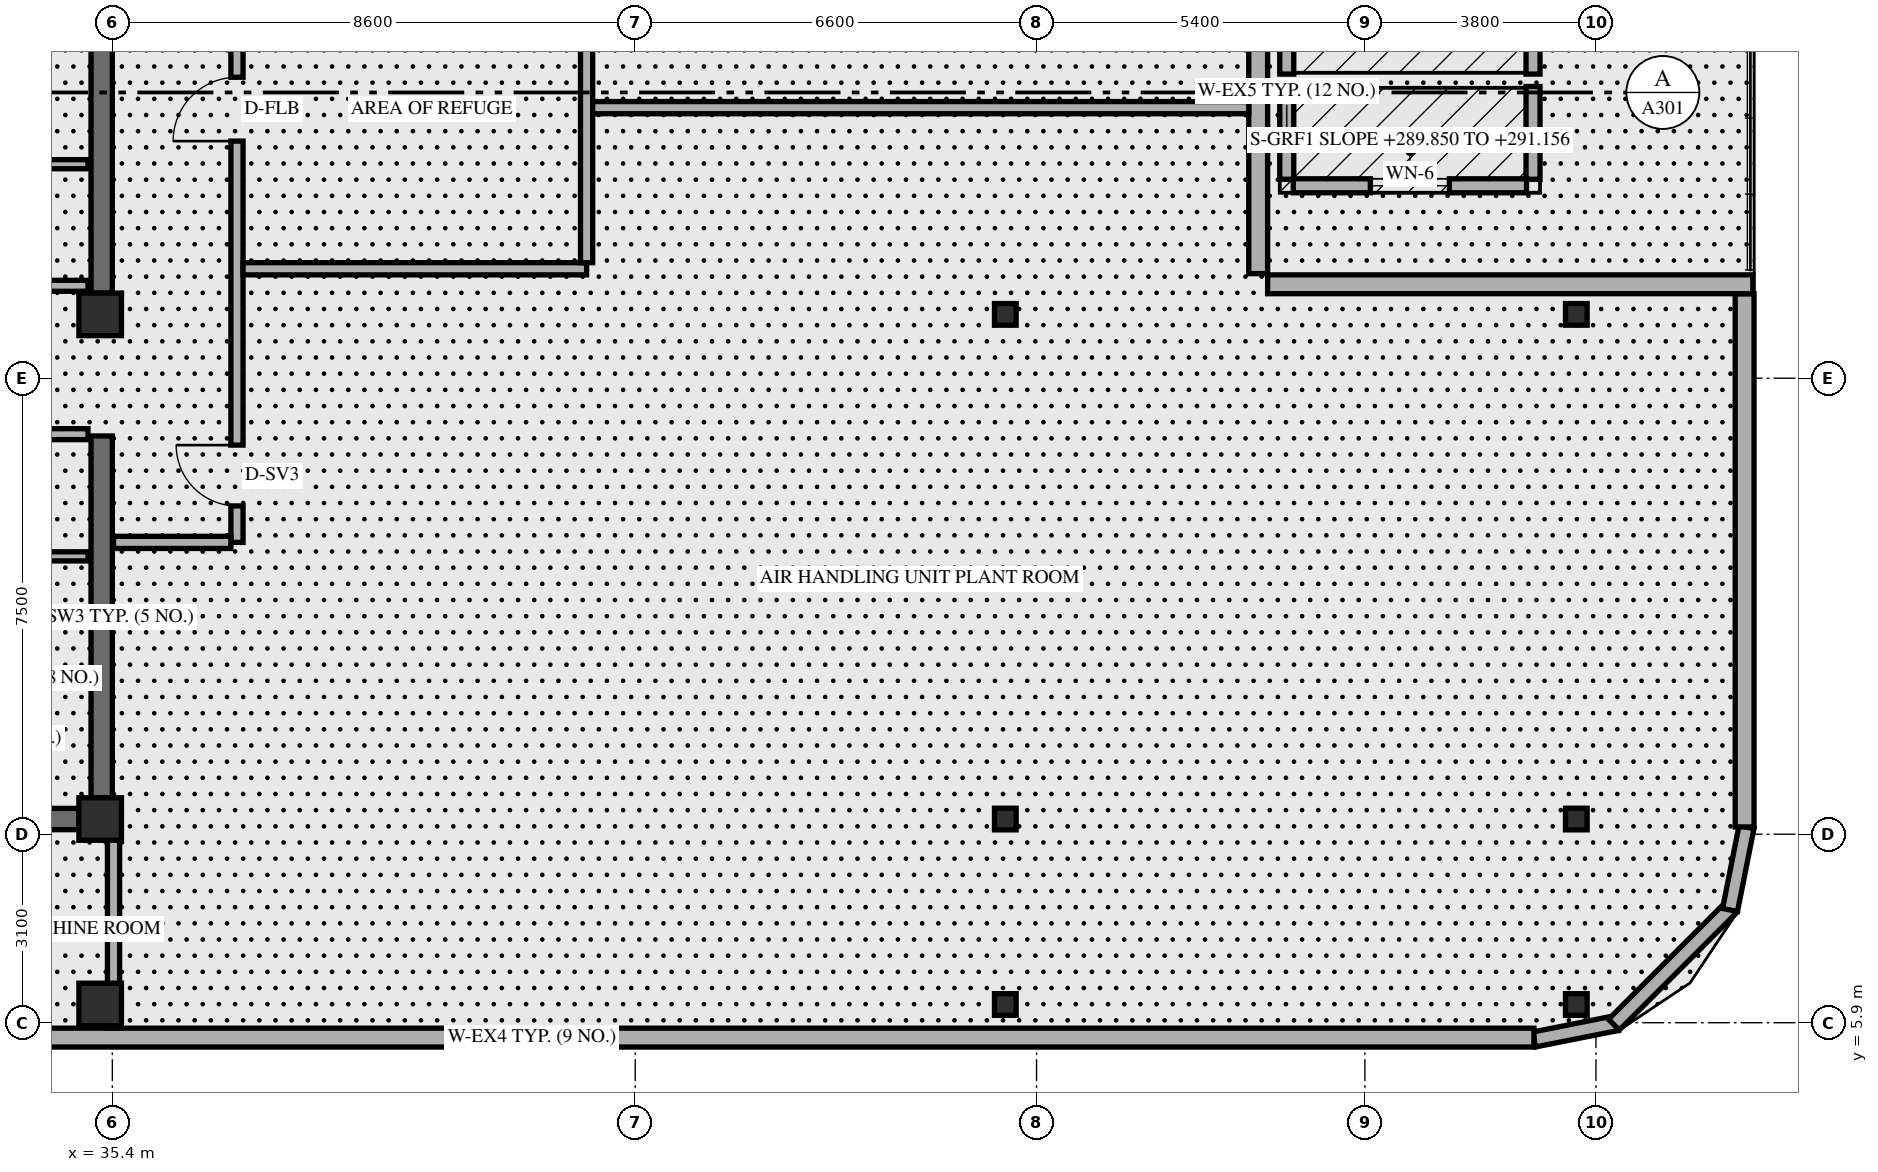
"""IFC4 building model, lengths in metres.
Left out: names, types, materials, properties, quantities, classifications, styles, units other than length and angle.
Written with IfcOpenShell. Run it as: python <this file> out.ifc"""

import sys

from ifc_helpers import new_model, si_unit, direction, frame, frame_2d, origin, origin_2d, place, context, subcontext, project, spatial, rectangle, hollow_rectangle, extrude, element, fill, save


model = new_model("IFC4")
c1 = context("Model", 3, precision=1e-05, world=origin(), true_north=direction((0.0, 1.0)))
c2 = subcontext(c1, "Body", "Model", "MODEL_VIEW")
j1 = project(units=[si_unit("LENGTHUNIT", "METRE"), si_unit("PLANEANGLEUNIT", "RADIAN")], contexts=[c1])
p1 = place(None, origin())
s1 = spatial("IfcSite", under=j1, at=p1, CompositionType="ELEMENT")
p2 = place(p1, origin())
s2 = spatial("IfcBuilding", under=s1, at=p2, CompositionType="ELEMENT")
p3 = place(p2, frame((0.0, 0.0, 287.0)))
s3 = spatial("IfcBuildingStorey", under=s2, at=p3, CompositionType="ELEMENT", Elevation=287.0)
p4 = place(p3, frame((35.225, 9.6, 0.0), z_axis=(0.0, 0.0, 1.0), x_axis=(0.0, 1.0, 0.0)))
e1 = element("IfcWall", 1, at=p4, inside=s3, PredefinedType="SHEAR", context=c2, shape_type="SweptSolid", body=[
    extrude(rectangle(XDim=5.95, YDim=0.35, at=frame_2d((2.975, 0.0))), origin(), (0.0, 0.0, 1.0), 5.161),
])
p5 = place(p3, frame((35.225, 17.9, 0.0), z_axis=(0.0, 0.0, 1.0), x_axis=(0.0, 1.0, 0.0)))
e2 = element("IfcWall", 2, at=p5, inside=s3, PredefinedType="SHEAR", context=c2, shape_type="SweptSolid", body=[
    extrude(rectangle(XDim=10.2, YDim=0.35, at=frame_2d((5.1, 0.0))), origin(), (0.0, 0.0, 1.0), 5.161),
])
p6 = place(p3, frame((24.55, 9.25, 0.0), z_axis=(0.0, 0.0, 1.0), x_axis=(1.0, 0.0, 0.0)))
e3 = element("IfcWall", 3, at=p6, inside=s3, PredefinedType="SHEAR", context=c2, shape_type="SweptSolid", body=[
    extrude(rectangle(XDim=10.3, YDim=0.35, at=frame_2d((5.15, 0.0))), origin(), (0.0, 0.0, 1.0), 5.7),
])
p7 = place(p6, frame((4.5, 0.0, 0.0)))
e4 = element("IfcOpeningElement", 4, at=p7, cuts=e3, PredefinedType="OPENING", context=c2, shape_type="SweptSolid", body=[
    extrude(rectangle(XDim=1.0, YDim=2.15, at=frame_2d((0.5, 1.075))), frame((0.0, 0.185, 0.0), z_axis=(0.0, -1.0, 0.0), x_axis=(1.0, 0.0, 0.0)), (0.0, 0.0, 1.0), 0.37),
])
for number, where, z_axis, x_axis in (
    (5, (35.2, 6.2, 0.0), (0.0, 0.0, 1.0), (1.0, 0.0, 0.0)),
    (6, (35.2, 9.25, 0.0), (0.0, 0.0, 1.0), (1.0, 0.0, 0.0)),
    (7, (35.2, 17.55, 0.0), (0.0, 0.0, 1.0), (1.0, 0.0, 0.0)),
):
    element("IfcColumn", number, at=place(p3, frame(where, z_axis=z_axis, x_axis=x_axis)), inside=s3, PredefinedType="COLUMN", context=c2, shape_type="SweptSolid", body=[
        extrude(rectangle(XDim=0.7, YDim=0.7, at=origin_2d()), origin(), (0.0, 0.0, 1.0), 5.996),
    ])
for number, where, z_axis, x_axis in (
    (8, (49.981, 6.2, 0.0), (0.035, 0.0, 0.999), (0.0, 1.0, 0.0)),
    (9, (49.981, 9.25, 0.0), (0.035, 0.0, 0.999), (0.0, 1.0, 0.0)),
    (10, (49.981, 17.55, 0.0), (0.035, 0.0, 0.999), (0.0, 1.0, 0.0)),
):
    element("IfcColumn", number, at=place(p3, frame(where, z_axis=z_axis, x_axis=x_axis)), inside=s3, PredefinedType="COLUMN", context=c2, shape_type="SweptSolid", body=[
        extrude(hollow_rectangle(XDim=0.356, YDim=0.356, WallThickness=0.016, at=origin_2d()), origin(), (0.0, 0.0, 1.0), 6.0),
    ])
for number, where, z_axis, x_axis in (
    (11, (59.303, 6.2, 0.0), (0.058, 0.0, 0.998), (0.0, 1.0, 0.0)),
    (12, (59.303, 9.25, 0.0), (0.058, 0.0, 0.998), (0.0, 1.0, 0.0)),
    (13, (59.303, 17.55, 0.0), (0.058, 0.0, 0.998), (0.0, 1.0, 0.0)),
):
    element("IfcColumn", number, at=place(p3, frame(where, z_axis=z_axis, x_axis=x_axis)), inside=s3, PredefinedType="COLUMN", context=c2, shape_type="SweptSolid", body=[
        extrude(hollow_rectangle(XDim=0.356, YDim=0.356, WallThickness=0.016, at=origin_2d()), origin(), (0.0, 0.0, 1.0), 6.006),
    ])
p8 = place(p3, frame((58.783, 5.624, 0.0), z_axis=(0.0, 0.0, 1.0), x_axis=(0.980809899341, 0.19496651342, 0.0)))
e14 = element("IfcWall", 14, at=p8, inside=s3, PredefinedType="SOLIDWALL", context=c2, shape_type="SweptSolid", body=[
    extrude(rectangle(XDim=1.389, YDim=0.25, at=frame_2d((0.694, 0.0))), origin(), (0.0, 0.0, 1.0), 5.7),
])
p9 = place(p3, frame((60.095, 5.868, 0.0), z_axis=(0.0, 0.0, 1.0), x_axis=(0.707106781187, 0.707106781187, 0.0)))
e15 = element("IfcWall", 15, at=p9, inside=s3, PredefinedType="SOLIDWALL", context=c2, shape_type="SweptSolid", body=[
    extrude(rectangle(XDim=2.739, YDim=0.25, at=frame_2d((1.37, 0.0))), origin(), (0.0, 0.0, 1.0), 5.7),
])
p10 = place(p3, frame((62.005, 7.754, 0.0), z_axis=(0.0, 0.0, 1.0), x_axis=(0.195135625965, 0.9807762678, 0.0)))
e16 = element("IfcWall", 16, at=p10, inside=s3, PredefinedType="SOLIDWALL", context=c2, shape_type="SweptSolid", body=[
    extrude(rectangle(XDim=1.389, YDim=0.25, at=frame_2d((0.694, 0.0))), origin(), (0.0, 0.0, 1.0), 5.7),
])
p11 = place(p3, frame((25.82, 5.655, 0.0), z_axis=(0.0, 0.0, 1.0), x_axis=(1.0, 0.0, 0.0)))
e17 = element("IfcWall", 17, at=p11, inside=s3, PredefinedType="SOLIDWALL", context=c2, shape_type="SweptSolid", body=[
    extrude(rectangle(XDim=32.96, YDim=0.31, at=frame_2d((16.48, 0.0))), origin(), (0.0, 0.0, 1.0), 5.7),
])
p12 = place(p3, frame((62.245, 9.12, 0.0), z_axis=(0.0, 0.0, 1.0), x_axis=(0.0, 1.0, 0.0)))
e18 = element("IfcWall", 18, at=p12, inside=s3, PredefinedType="SOLIDWALL", context=c2, shape_type="SweptSolid", body=[
    extrude(rectangle(XDim=8.77, YDim=0.31, at=frame_2d((4.385, 0.0))), origin(), (0.0, 0.0, 1.0), 5.7),
])
p13 = place(p3, frame((54.4, 18.045, 0.0), z_axis=(0.0, 0.0, 1.0), x_axis=(1.0, 0.0, 0.0)))
e19 = element("IfcWall", 19, at=p13, inside=s3, PredefinedType="SOLIDWALL", context=c2, shape_type="SweptSolid", body=[
    extrude(rectangle(XDim=7.98, YDim=0.31, at=frame_2d((3.99, 0.0))), origin(), (0.0, 0.0, 1.0), 5.219),
])
p14 = place(p3, frame((54.245, 18.22, 0.0), z_axis=(0.0, 0.0, 1.0), x_axis=(0.0, 1.0, 0.0)))
e20 = element("IfcWall", 20, at=p14, inside=s3, PredefinedType="SOLIDWALL", context=c2, shape_type="SweptSolid", body=[
    extrude(rectangle(XDim=11.36, YDim=0.31, at=frame_2d((5.68, 0.0))), origin(), (0.0, 0.0, 1.0), 5.7),
])
p15 = place(p14, frame((5.16, 0.0, 0.0)))
e21 = element("IfcOpeningElement", 21, at=p15, cuts=e20, PredefinedType="OPENING", context=c2, shape_type="SweptSolid", body=[
    extrude(rectangle(XDim=1.05, YDim=2.15, at=frame_2d((0.525, 1.075))), frame((0.0, 0.165, 0.0), z_axis=(0.0, -1.0, 0.0), x_axis=(1.0, 0.0, 0.0)), (0.0, 0.0, 1.0), 0.33),
])
for number, where, z_axis, x_axis in (
    (22, (54.715, 19.772, 0.0), (0.0, 0.0, 1.0), (0.0, 1.0, 0.0)),
    (23, (54.715, 21.502, 0.0), (0.0, 0.0, 1.0), (0.0, 1.0, 0.0)),
    (24, (58.765, 19.772, 0.0), (0.0, 0.0, 1.0), (0.0, 1.0, 0.0)),
    (25, (58.765, 21.502, 0.0), (0.0, 0.0, 1.0), (0.0, 1.0, 0.0)),
):
    element("IfcWall", number, at=place(p3, frame(where, z_axis=z_axis, x_axis=x_axis)), inside=s3, PredefinedType="SOLIDWALL", context=c2, shape_type="SweptSolid", body=[
        extrude(rectangle(XDim=1.526, YDim=0.23, at=frame_2d((0.763, 0.0))), origin(), (0.0, 0.0, 1.0), 2.264),
    ])
p16 = place(p3, frame((54.822, 19.665, 0.0), z_axis=(0.0, 0.0, 1.0), x_axis=(1.0, 0.0, 0.0)))
e26 = element("IfcWall", 26, at=p16, inside=s3, PredefinedType="SOLIDWALL", context=c2, shape_type="SweptSolid", body=[
    extrude(rectangle(XDim=3.836, YDim=0.23, at=frame_2d((1.918, 0.0))), origin(), (0.0, 0.0, 1.0), 2.264),
])
p17 = place(p16, frame((1.268, 0.0, 0.78)))
e27 = element("IfcOpeningElement", 27, at=p17, cuts=e26, PredefinedType="OPENING", context=c2, shape_type="SweptSolid", body=[
    extrude(rectangle(XDim=1.3, YDim=1.25, at=frame_2d((0.65, 0.625))), frame((0.0, 0.125, 0.0), z_axis=(0.0, -1.0, 0.0), x_axis=(1.0, 0.0, 0.0)), (0.0, 0.0, 1.0), 0.25),
])
p18 = place(p3, frame((32.74, 15.58, 0.0), z_axis=(0.0, 0.0, 1.0), x_axis=(1.0, 0.0, 0.0)))
e28 = element("IfcWall", 28, at=p18, inside=s3, PredefinedType="STANDARD", context=c2, shape_type="SweptSolid", body=[
    extrude(rectangle(XDim=2.26, YDim=0.18, at=frame_2d((1.13, 0.0))), origin(), (0.0, 0.0, 1.0), 5.7),
])
for number, where, z_axis, x_axis in (
    (29, (32.74, 11.57, 0.0), (0.0, 0.0, 1.0), (1.0, 0.0, 0.0)),
    (30, (32.74, 13.57, 0.0), (0.0, 0.0, 1.0), (1.0, 0.0, 0.0)),
):
    element("IfcWall", number, at=place(p3, frame(where, z_axis=z_axis, x_axis=x_axis)), inside=s3, PredefinedType="STANDARD", context=c2, shape_type="SweptSolid", body=[
        extrude(rectangle(XDim=2.26, YDim=0.15, at=frame_2d((1.13, 0.0))), origin(), (0.0, 0.0, 1.0), 5.7),
    ])
p19 = place(p3, frame((32.74, 18.02, 0.0), z_axis=(0.0, 0.0, 1.0), x_axis=(1.0, 0.0, 0.0)))
e31 = element("IfcWall", 31, at=p19, inside=s3, PredefinedType="STANDARD", context=c2, shape_type="SweptSolid", body=[
    extrude(rectangle(XDim=2.26, YDim=0.18, at=frame_2d((1.13, 0.0))), origin(), (0.0, 0.0, 1.0), 5.7),
])
p20 = place(p3, frame((32.74, 20.02, 0.0), z_axis=(0.0, 0.0, 1.0), x_axis=(1.0, 0.0, 0.0)))
e32 = element("IfcWall", 32, at=p20, inside=s3, PredefinedType="STANDARD", context=c2, shape_type="SweptSolid", body=[
    extrude(rectangle(XDim=2.26, YDim=0.15, at=frame_2d((1.13, 0.0))), origin(), (0.0, 0.0, 1.0), 5.7),
])
p21 = place(p3, frame((37.45, 13.8, 0.0), z_axis=(0.0, 0.0, 1.0), x_axis=(0.0, 1.0, 0.0)))
e33 = element("IfcWall", 33, at=p21, inside=s3, PredefinedType="STANDARD", context=c2, shape_type="SweptSolid", body=[
    extrude(rectangle(XDim=25.0, YDim=0.2, at=frame_2d((12.5, 0.0))), origin(), (0.0, 0.0, 1.0), 5.143),
])
p22 = place(p21, frame((6.6, 0.0, 0.0)))
e34 = element("IfcOpeningElement", 34, at=p22, cuts=e33, PredefinedType="OPENING", context=c2, shape_type="SweptSolid", body=[
    extrude(rectangle(XDim=1.05, YDim=2.15, at=frame_2d((0.525, 1.075))), frame((0.0, 0.11, 0.0), z_axis=(0.0, -1.0, 0.0), x_axis=(1.0, 0.0, 0.0)), (0.0, 0.0, 1.0), 0.22),
])
p23 = place(p21, frame((0.6, 0.0, 0.0)))
e35 = element("IfcOpeningElement", 35, at=p23, cuts=e33, PredefinedType="OPENING", context=c2, shape_type="SweptSolid", body=[
    extrude(rectangle(XDim=1.0, YDim=2.15, at=frame_2d((0.5, 1.075))), frame((0.0, 0.11, 0.0), z_axis=(0.0, -1.0, 0.0), x_axis=(1.0, 0.0, 0.0)), (0.0, 0.0, 1.0), 0.22),
])
p24 = place(p21, frame((11.6, 0.0, 0.0)))
e36 = element("IfcOpeningElement", 36, at=p24, cuts=e33, PredefinedType="OPENING", context=c2, shape_type="SweptSolid", body=[
    extrude(rectangle(XDim=1.05, YDim=2.15, at=frame_2d((0.525, 1.075))), frame((0.0, 0.11, 0.0), z_axis=(0.0, -1.0, 0.0), x_axis=(1.0, 0.0, 0.0)), (0.0, 0.0, 1.0), 0.22),
])
p25 = place(p21, frame((18.1, 0.0, 0.0)))
e37 = element("IfcOpeningElement", 37, at=p25, cuts=e33, PredefinedType="OPENING", context=c2, shape_type="SweptSolid", body=[
    extrude(rectangle(XDim=1.05, YDim=2.15, at=frame_2d((0.525, 1.075))), frame((0.0, 0.11, 0.0), z_axis=(0.0, -1.0, 0.0), x_axis=(1.0, 0.0, 0.0)), (0.0, 0.0, 1.0), 0.22),
])
p26 = place(p21, frame((22.0, 0.0, 0.0)))
e38 = element("IfcOpeningElement", 38, at=p26, cuts=e33, PredefinedType="OPENING", context=c2, shape_type="SweptSolid", body=[
    extrude(rectangle(XDim=1.05, YDim=2.15, at=frame_2d((0.525, 1.075))), frame((0.0, 0.11, 0.0), z_axis=(0.0, -1.0, 0.0), x_axis=(1.0, 0.0, 0.0)), (0.0, 0.0, 1.0), 0.22),
])
p27 = place(p3, frame((35.42, 13.8, 0.0), z_axis=(0.0, 0.0, 1.0), x_axis=(1.0, 0.0, 0.0)))
e39 = element("IfcWall", 39, at=p27, inside=s3, PredefinedType="STANDARD", context=c2, shape_type="SweptSolid", body=[
    extrude(rectangle(XDim=1.93, YDim=0.2, at=frame_2d((0.965, 0.0))), origin(), (0.0, 0.0, 1.0), 5.379),
])
p28 = place(p3, frame((37.55, 18.3, 0.0), z_axis=(0.0, 0.0, 1.0), x_axis=(1.0, 0.0, 0.0)))
e40 = element("IfcWall", 40, at=p28, inside=s3, PredefinedType="STANDARD", context=c2, shape_type="SweptSolid", body=[
    extrude(rectangle(XDim=5.65, YDim=0.2, at=frame_2d((2.825, 0.0))), origin(), (0.0, 0.0, 1.0), 5.7),
])
p29 = place(p3, frame((43.2, 18.4, 0.0), z_axis=(0.0, 0.0, 1.0), x_axis=(0.0, 1.0, 0.0)))
e41 = element("IfcWall", 41, at=p29, inside=s3, PredefinedType="STANDARD", context=c2, shape_type="SweptSolid", body=[
    extrude(rectangle(XDim=5.1, YDim=0.2, at=frame_2d((2.55, 0.0))), origin(), (0.0, 0.0, 1.0), 5.7),
])
p30 = place(p3, frame((43.3, 20.95, 0.0), z_axis=(0.0, 0.0, 1.0), x_axis=(1.0, 0.0, 0.0)))
e42 = element("IfcWall", 42, at=p30, inside=s3, PredefinedType="STANDARD", context=c2, shape_type="SweptSolid", body=[
    extrude(rectangle(XDim=10.79, YDim=0.2, at=frame_2d((5.395, 0.0))), origin(), (0.0, 0.0, 1.0), 5.143),
])
p31 = place(p3, frame((35.42, 5.81, 0.0), z_axis=(0.0, 0.0, 1.0), x_axis=(0.0, 1.0, 0.0)))
e43 = element("IfcWall", 43, at=p31, inside=s3, PredefinedType="STANDARD", context=c2, shape_type="SweptSolid", body=[
    extrude(rectangle(XDim=3.44, YDim=0.2, at=frame_2d((1.72, 0.0))), origin(), (0.0, 0.0, 1.0), 5.143),
])
p32 = place(p17, origin())
e44 = element("IfcWindow", 44, at=p32, inside=s3, PartitioningType="SINGLE_PANEL", PredefinedType="WINDOW", context=c2, shape_type="SweptSolid", body=[
    extrude(rectangle(XDim=1.3, YDim=1.25, at=frame_2d((0.65, 0.625))), frame((0.0, 0.03, 0.0), z_axis=(0.0, -1.0, 0.0), x_axis=(1.0, 0.0, 0.0)), (0.0, 0.0, 1.0), 0.06),
])
fill(e27, e44)
p33 = place(p22, origin())
e45 = element("IfcDoor", 45, at=p33, inside=s3, OperationType="SINGLE_SWING_LEFT", PredefinedType="DOOR", context=c2, shape_type="SweptSolid", body=[
    extrude(rectangle(XDim=1.05, YDim=2.15, at=frame_2d((0.525, 1.075))), frame((0.0, 0.025, 0.0), z_axis=(0.0, -1.0, 0.0), x_axis=(1.0, 0.0, 0.0)), (0.0, 0.0, 1.0), 0.05),
])
fill(e34, e45)
p34 = place(p23, origin())
e46 = element("IfcDoor", 46, at=p34, inside=s3, OperationType="SINGLE_SWING_RIGHT", PredefinedType="DOOR", context=c2, shape_type="SweptSolid", body=[
    extrude(rectangle(XDim=1.0, YDim=2.15, at=frame_2d((0.5, 1.075))), frame((0.0, 0.025, 0.0), z_axis=(0.0, -1.0, 0.0), x_axis=(1.0, 0.0, 0.0)), (0.0, 0.0, 1.0), 0.05),
])
fill(e35, e46)
save(model, sys.argv[1])
